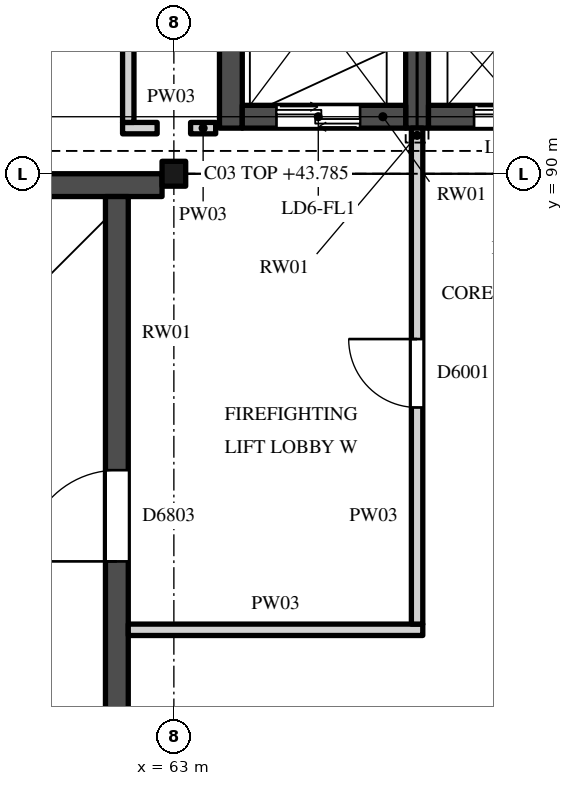
"""IFC4 building model, lengths in metres.
Left out: names, types, materials, properties, quantities, classifications, styles, units other than length and angle.
Written with IfcOpenShell. Run it as: python <this file> out.ifc"""

import sys

from ifc_helpers import new_model, si_unit, direction, frame, frame_2d, origin, origin_2d, place, context, subcontext, project, spatial, polyline, rectangle, i_section, outline, extrude, element, fill, save


model = new_model("IFC4")
c1 = context("Model", 3, precision=1e-05, world=origin(), true_north=direction((0.0, 1.0)))
c2 = subcontext(c1, "Body", "Model", "MODEL_VIEW")
j1 = project(units=[si_unit("LENGTHUNIT", "METRE"), si_unit("PLANEANGLEUNIT", "RADIAN")], contexts=[c1])
p1 = place(None, origin())
s1 = spatial("IfcSite", under=j1, at=p1, CompositionType="ELEMENT")
p2 = place(p1, origin())
s2 = spatial("IfcBuilding", under=s1, at=p2, CompositionType="ELEMENT")
p3 = place(p2, frame((0.0, 0.0, 36.0)))
s3 = spatial("IfcBuildingStorey", under=s2, at=p3, CompositionType="ELEMENT", Elevation=36.0)
p4 = place(p3, frame((63.0, 90.0, 0.0), z_axis=(0.0, 0.0, 1.0), x_axis=(1.0, 0.0, 0.0)))
e1 = element("IfcColumn", 1, at=p4, inside=s3, PredefinedType="COLUMN", context=c2, shape_type="SweptSolid", body=[
    extrude(i_section(OverallWidth=0.311, OverallDepth=0.327, WebThickness=0.016, FlangeThickness=0.025, FilletRadius=0.017, at=origin_2d()), origin(), (0.0, 0.0, 1.0), 7.785),
])
p5 = place(p3, frame((54.3, 89.85, 0.0), z_axis=(0.0, 0.0, 1.0), x_axis=(1.0, 0.0, 0.0)))
e2 = element("IfcWall", 2, at=p5, inside=s3, PredefinedType="SHEAR", context=c2, shape_type="SweptSolid", body=[
    extrude(rectangle(XDim=8.544, YDim=0.3, at=frame_2d((4.272, 0.0))), origin(), (0.0, 0.0, 1.0), 7.864),
])
p6 = place(p3, frame((62.25, 81.9, 0.0), z_axis=(0.0, 0.0, 1.0), x_axis=(0.0, 1.0, 0.0)))
e3 = element("IfcWall", 3, at=p6, inside=s3, PredefinedType="SHEAR", context=c2, shape_type="SweptSolid", body=[
    extrude(outline(polyline([(0.0, 0.0), (7.8, 0.0), (7.8, 7.984), (0.0, 14.224), (0.0, 0.0)])), frame((0.0, 0.15, 0.0), z_axis=(0.0, -1.0, 0.0), x_axis=(1.0, 0.0, 0.0)), (0.0, 0.0, 1.0), 0.3),
])
p7 = place(p6, frame((3.0, 0.0, 0.0)))
e4 = element("IfcOpeningElement", 4, at=p7, cuts=e3, PredefinedType="OPENING", context=c2, shape_type="SweptSolid", body=[
    extrude(rectangle(XDim=1.2, YDim=2.1, at=frame_2d((0.6, 1.05))), frame((0.0, 0.16, 0.0), z_axis=(0.0, -1.0, 0.0), x_axis=(1.0, 0.0, 0.0)), (0.0, 0.0, 1.0), 0.32),
])
p8 = place(p3, frame((63.75, 90.6, 0.0), z_axis=(0.0, 0.0, 1.0), x_axis=(0.0, 1.0, 0.0)))
e5 = element("IfcWall", 5, at=p8, inside=s3, PredefinedType="SHEAR", context=c2, shape_type="SweptSolid", body=[
    extrude(rectangle(XDim=3.6, YDim=0.3, at=frame_2d((1.8, 0.0))), origin(), (0.0, 0.0, 1.0), 8.405),
])
p9 = place(p3, frame((66.2, 90.6, 0.0), z_axis=(0.0, 0.0, 1.0), x_axis=(0.0, 1.0, 0.0)))
e6 = element("IfcWall", 6, at=p9, inside=s3, PredefinedType="SHEAR", context=c2, shape_type="SweptSolid", body=[
    extrude(rectangle(XDim=3.6, YDim=0.3, at=frame_2d((1.8, 0.0))), origin(), (0.0, 0.0, 1.0), 9.644),
])
p10 = place(p3, frame((66.2, 90.6, 7.8), z_axis=(0.0, 0.0, 1.0), x_axis=(0.0, -1.0, 0.0)))
e7 = element("IfcWall", 7, at=p10, inside=s3, PredefinedType="SHEAR", context=c2, shape_type="SweptSolid", body=[
    extrude(rectangle(XDim=0.19, YDim=0.3, at=frame_2d((0.095, 0.0))), origin(), (0.0, 0.0, 1.0), 1.844),
])
p11 = place(p3, frame((63.9, 90.75, 0.0), z_axis=(0.0, 0.0, 1.0), x_axis=(1.0, 0.0, 0.0)))
e8 = element("IfcWall", 8, at=p11, inside=s3, PredefinedType="SHEAR", context=c2, shape_type="SweptSolid", body=[
    extrude(outline(polyline([(0.0, 0.0), (2.15, 0.0), (2.15, 9.596), (1.344, 9.334), (1.075, 9.21), (0.269, 8.746), (0.0, 8.54), (0.0, 0.0)])), frame((0.0, 0.15, 0.0), z_axis=(0.0, -1.0, 0.0), x_axis=(1.0, 0.0, 0.0)), (0.0, 0.0, 1.0), 0.3),
])
p12 = place(p11, frame((0.45, 0.0, 0.0)))
e9 = element("IfcOpeningElement", 9, at=p12, cuts=e8, PredefinedType="OPENING", context=c2, shape_type="SweptSolid", body=[
    extrude(rectangle(XDim=1.1, YDim=2.1, at=frame_2d((0.55, 1.05))), frame((0.0, 0.16, 0.0), z_axis=(0.0, -1.0, 0.0), x_axis=(1.0, 0.0, 0.0)), (0.0, 0.0, 1.0), 0.32),
])
p13 = place(p3, frame((66.35, 90.75, 0.0), z_axis=(0.0, 0.0, 1.0), x_axis=(1.0, 0.0, 0.0)))
e10 = element("IfcWall", 10, at=p13, inside=s3, PredefinedType="SHEAR", context=c2, shape_type="SweptSolid", body=[
    extrude(outline(polyline([(0.0, 0.0), (2.3, 0.0), (2.3, 9.678), (1.278, 9.785), (1.022, 9.785), (0.0, 9.678), (0.0, 0.0)])), frame((0.0, 0.15, 0.0), z_axis=(0.0, -1.0, 0.0), x_axis=(1.0, 0.0, 0.0)), (0.0, 0.0, 1.0), 0.3),
])
p14 = place(p13, frame((0.6, 0.0, 0.0)))
e11 = element("IfcOpeningElement", 11, at=p14, cuts=e10, PredefinedType="OPENING", context=c2, shape_type="SweptSolid", body=[
    extrude(rectangle(XDim=1.1, YDim=2.1, at=frame_2d((0.55, 1.05))), frame((0.0, 0.16, 0.0), z_axis=(0.0, -1.0, 0.0), x_axis=(1.0, 0.0, 0.0)), (0.0, 0.0, 1.0), 0.32),
])
p15 = place(p3, frame((54.156, 90.15, 7.8), z_axis=(0.0, 0.0, 1.0), x_axis=(1.0, 0.0, 0.0)))
e12 = element("IfcWall", 12, at=p15, inside=s3, PredefinedType="SOLIDWALL", context=c2, shape_type="SweptSolid", body=[
    extrude(outline(polyline([(0.0, 0.0), (62.689, 0.0), (62.689, 0.071), (61.785, 0.883), (60.725, 1.494), (59.561, 1.871), (58.344, 1.999), (57.128, 1.871), (55.964, 1.494), (54.904, 0.883), (53.844, 0.05), (52.785, 0.883), (51.725, 1.494), (50.561, 1.871), (49.344, 1.999), (48.128, 1.871), (46.964, 1.494), (45.904, 0.883), (44.844, 0.05), (43.785, 0.883), (42.725, 1.494), (41.561, 1.871), (40.344, 1.999), (39.128, 1.871), (37.964, 1.494), (36.904, 0.883), (35.844, 0.05), (34.785, 0.883), (33.725, 1.494), (32.561, 1.871), (31.344, 1.999), (30.128, 1.871), (28.964, 1.494), (27.904, 0.883), (26.844, 0.05), (25.785, 0.883), (24.725, 1.494), (23.561, 1.871), (22.344, 1.999), (21.128, 1.871), (19.964, 1.494), (18.904, 0.883), (17.844, 0.05), (16.785, 0.883), (15.725, 1.494), (14.561, 1.871), (13.344, 1.999), (12.128, 1.871), (10.964, 1.494), (9.904, 0.883), (8.844, 0.05), (7.785, 0.883), (6.725, 1.494), (5.561, 1.871), (4.344, 1.999), (3.128, 1.871), (1.964, 1.494), (0.904, 0.883), (0.0, 0.071), (0.0, 0.0)])), frame((0.0, 0.15, 0.0), z_axis=(0.0, -1.0, 0.0), x_axis=(1.0, 0.0, 0.0)), (0.0, 0.0, 1.0), 0.3),
])
p16 = place(p3, frame((62.4, 84.0, 0.0), z_axis=(0.0, 0.0, 1.0), x_axis=(1.0, 0.0, 0.0)))
e13 = element("IfcWall", 13, at=p16, inside=s3, PredefinedType="PARTITIONING", context=c2, shape_type="SweptSolid", body=[
    extrude(rectangle(XDim=3.875, YDim=0.15, at=frame_2d((1.938, 0.0))), origin(), (0.0, 0.0, 1.0), 7.744),
])
p17 = place(p3, frame((62.325, 90.6, 0.0), z_axis=(0.0, 0.0, 1.0), x_axis=(1.0, 0.0, 0.0)))
e14 = element("IfcWall", 14, at=p17, inside=s3, PredefinedType="PARTITIONING", context=c2, shape_type="SweptSolid", body=[
    extrude(rectangle(XDim=0.455, YDim=0.15, at=frame_2d((0.228, 0.0))), origin(), (0.0, 0.0, 1.0), 7.731),
])
p18 = place(p3, frame((63.22, 90.6, 0.0), z_axis=(0.0, 0.0, 1.0), x_axis=(1.0, 0.0, 0.0)))
e15 = element("IfcWall", 15, at=p18, inside=s3, PredefinedType="PARTITIONING", context=c2, shape_type="SweptSolid", body=[
    extrude(rectangle(XDim=0.33, YDim=0.15, at=frame_2d((0.165, 0.0))), origin(), (0.0, 0.0, 1.0), 7.731),
])
p19 = place(p3, frame((62.4, 90.675, 0.0), z_axis=(0.0, 0.0, 1.0), x_axis=(0.0, 1.0, 0.0)))
e16 = element("IfcWall", 16, at=p19, inside=s3, PredefinedType="PARTITIONING", context=c2, shape_type="SweptSolid", body=[
    extrude(rectangle(XDim=3.45, YDim=0.15, at=frame_2d((1.725, 0.0))), origin(), (0.0, 0.0, 1.0), 7.731),
])
p20 = place(p3, frame((66.2, 84.075, 0.0), z_axis=(0.0, 0.0, 1.0), x_axis=(0.0, 1.0, 0.0)))
e17 = element("IfcWall", 17, at=p20, inside=s3, PredefinedType="PARTITIONING", context=c2, shape_type="SweptSolid", body=[
    extrude(rectangle(XDim=6.525, YDim=0.15, at=frame_2d((3.263, 0.0))), origin(), (0.0, 0.0, 1.0), 7.744),
])
p21 = place(p20, frame((2.85, 0.0, 0.0)))
e18 = element("IfcOpeningElement", 18, at=p21, cuts=e17, PredefinedType="OPENING", context=c2, shape_type="SweptSolid", body=[
    extrude(rectangle(XDim=0.9, YDim=2.1, at=frame_2d((0.45, 1.05))), frame((0.0, 0.085, 0.0), z_axis=(0.0, -1.0, 0.0), x_axis=(1.0, 0.0, 0.0)), (0.0, 0.0, 1.0), 0.17),
])
p22 = place(p7, origin())
e19 = element("IfcDoor", 19, at=p22, inside=s3, OperationType="SINGLE_SWING_RIGHT", PredefinedType="DOOR", context=c2, shape_type="SweptSolid", body=[
    extrude(rectangle(XDim=1.2, YDim=2.1, at=frame_2d((0.6, 1.05))), frame((0.0, 0.025, 0.0), z_axis=(0.0, -1.0, 0.0), x_axis=(1.0, 0.0, 0.0)), (0.0, 0.0, 1.0), 0.05),
])
fill(e4, e19)
p23 = place(p12, origin())
e20 = element("IfcDoor", 20, at=p23, inside=s3, OperationType="DOUBLE_DOOR_SLIDING", PredefinedType="DOOR", context=c2, shape_type="SweptSolid", body=[
    extrude(rectangle(XDim=1.1, YDim=2.1, at=frame_2d((0.55, 1.05))), frame((0.0, 0.025, 0.0), z_axis=(0.0, -1.0, 0.0), x_axis=(1.0, 0.0, 0.0)), (0.0, 0.0, 1.0), 0.05),
])
fill(e9, e20)
p24 = place(p14, origin())
e21 = element("IfcDoor", 21, at=p24, inside=s3, OperationType="DOUBLE_DOOR_SLIDING", PredefinedType="DOOR", context=c2, shape_type="SweptSolid", body=[
    extrude(rectangle(XDim=1.1, YDim=2.1, at=frame_2d((0.55, 1.05))), frame((0.0, 0.025, 0.0), z_axis=(0.0, -1.0, 0.0), x_axis=(1.0, 0.0, 0.0)), (0.0, 0.0, 1.0), 0.05),
])
fill(e11, e21)
p25 = place(p21, origin())
e22 = element("IfcDoor", 22, at=p25, inside=s3, OperationType="SINGLE_SWING_LEFT", PredefinedType="DOOR", context=c2, shape_type="SweptSolid", body=[
    extrude(rectangle(XDim=0.9, YDim=2.1, at=frame_2d((0.45, 1.05))), frame((0.0, 0.025, 0.0), z_axis=(0.0, -1.0, 0.0), x_axis=(1.0, 0.0, 0.0)), (0.0, 0.0, 1.0), 0.05),
])
fill(e18, e22)
save(model, sys.argv[1])
